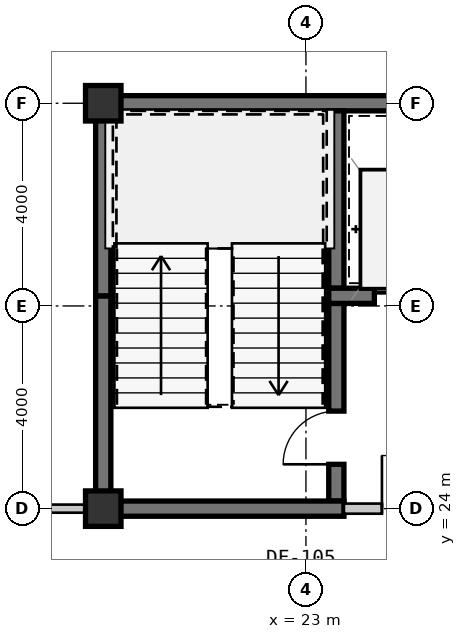
"""IFC4 building model, lengths in metres.
Left out: names, types, materials, properties, quantities, classifications, styles, units other than length and angle.
Written with IfcOpenShell. Run it as: python <this file> out.ifc"""

import sys

from ifc_helpers import new_model, si_unit, direction, frame, frame_2d, origin, origin_2d, place, context, subcontext, project, spatial, rectangle, extrude, source, transform, mapped, element, fill, save


model = new_model("IFC4")
c1 = context("Model", 3, precision=1e-05, world=origin(), true_north=direction((0.0, 1.0)))
c2 = subcontext(c1, "Body", "Model", "MODEL_VIEW")
j1 = project(units=[si_unit("LENGTHUNIT", "METRE"), si_unit("PLANEANGLEUNIT", "RADIAN")], contexts=[c1])
p1 = place(None, origin())
s1 = spatial("IfcSite", under=j1, at=p1, CompositionType="ELEMENT")
p2 = place(p1, origin())
s2 = spatial("IfcBuilding", under=s1, at=p2, CompositionType="ELEMENT")
p3 = place(p2, frame((0.0, 0.0, 87.15)))
s3 = spatial("IfcBuildingStorey", under=s2, at=p3, CompositionType="ELEMENT", Elevation=87.15)
m1 = source(origin(), c2, "Body", "SweptSolid", [
    extrude(rectangle(XDim=0.7, YDim=0.7, at=origin_2d()), origin(), (0.0, 0.0, 1.0), 3.15),
])
for number, where, z_axis, x_axis in (
    (1, (19.0, 24.0, 0.0), (0.0, 0.0, 1.0), (1.0, 0.0, 0.0)),
    (2, (19.0, 32.0, 0.0), (0.0, 0.0, 1.0), (1.0, 0.0, 0.0)),
):
    element("IfcColumn", number, at=place(p3, frame(where, z_axis=z_axis, x_axis=x_axis)), inside=s3, PredefinedType="COLUMN", context=c2, shape_type="MappedRepresentation", body=[
        mapped(m1, transform((0.0, 0.0, 0.0), scale=1.0)),
    ])
m2 = source(origin(), c2, "Body", "SweptSolid", [
    extrude(rectangle(XDim=9.15, YDim=0.3, at=frame_2d((4.575, 0.0))), origin(), (0.0, 0.0, 1.0), 2.93),
])
p4 = place(p3, frame((18.85, 32.0, 0.0), z_axis=(0.0, 0.0, 1.0), x_axis=(1.0, 0.0, 0.0)))
e3 = element("IfcWall", 3, at=p4, inside=s3, PredefinedType="SHEAR", context=c2, shape_type="MappedRepresentation", body=[
    mapped(m2, transform((0.0, 0.0, 0.0), scale=1.0)),
])
m3 = source(origin(), c2, "Body", "SweptSolid", [
    extrude(rectangle(XDim=4.05, YDim=0.3, at=frame_2d((2.025, 0.0))), origin(), (0.0, 0.0, 1.0), 2.93),
])
p5 = place(p3, frame((19.0, 24.15, 0.0), z_axis=(0.0, 0.0, 1.0), x_axis=(0.0, 1.0, 0.0)))
e4 = element("IfcWall", 4, at=p5, inside=s3, PredefinedType="SHEAR", context=c2, shape_type="MappedRepresentation", body=[
    mapped(m3, transform((0.0, 0.0, 0.0), scale=1.0)),
])
m4 = source(origin(), c2, "Body", "SweptSolid", [
    extrude(rectangle(XDim=3.65, YDim=0.3, at=frame_2d((1.825, 0.0))), origin(), (0.0, 0.0, 1.0), 2.93),
])
p6 = place(p3, frame((19.0, 28.2, 0.0), z_axis=(0.0, 0.0, 1.0), x_axis=(0.0, 1.0, 0.0)))
e5 = element("IfcWall", 5, at=p6, inside=s3, PredefinedType="SHEAR", context=c2, shape_type="MappedRepresentation", body=[
    mapped(m4, transform((0.0, 0.0, 0.0), scale=1.0)),
])
m5 = source(origin(), c2, "Body", "SweptSolid", [
    extrude(rectangle(XDim=3.5, YDim=0.3, at=frame_2d((1.75, 0.0))), origin(), (0.0, 0.0, 1.0), 2.93),
])
p7 = place(p3, frame((23.6, 28.35, 0.0), z_axis=(0.0, 0.0, 1.0), x_axis=(0.0, 1.0, 0.0)))
e6 = element("IfcWall", 6, at=p7, inside=s3, PredefinedType="SHEAR", context=c2, shape_type="MappedRepresentation", body=[
    mapped(m5, transform((0.0, 0.0, 0.0), scale=1.0)),
])
m6 = source(origin(), c2, "Body", "SweptSolid", [
    extrude(rectangle(XDim=3.9, YDim=0.3, at=frame_2d((1.95, 0.0))), origin(), (0.0, 0.0, 1.0), 2.93),
])
p8 = place(p3, frame((23.6, 24.15, 0.0), z_axis=(0.0, 0.0, 1.0), x_axis=(0.0, 1.0, 0.0)))
e7 = element("IfcWall", 7, at=p8, inside=s3, PredefinedType="SHEAR", context=c2, shape_type="MappedRepresentation", body=[
    mapped(m6, transform((0.0, 0.0, 0.0), scale=1.0)),
])
m7 = source(origin(), c2, "Body", "SweptSolid", [
    extrude(rectangle(XDim=1.05, YDim=2.1, at=frame_2d((0.525, 1.05))), frame((0.0, 0.16, 0.0), z_axis=(0.0, -1.0, 0.0), x_axis=(1.0, 0.0, 0.0)), (0.0, 0.0, 1.0), 0.32),
])
p9 = place(p8, frame((0.725, 0.0, 0.0)))
e8 = element("IfcOpeningElement", 8, at=p9, cuts=e7, PredefinedType="OPENING", context=c2, shape_type="MappedRepresentation", body=[
    mapped(m7, transform((0.0, 0.0, 0.0), scale=1.0)),
])
m8 = source(origin(), c2, "Body", "SweptSolid", [
    extrude(rectangle(XDim=4.9, YDim=0.3, at=frame_2d((2.45, 0.0))), origin(), (0.0, 0.0, 1.0), 2.93),
])
p10 = place(p3, frame((18.85, 24.0, 0.0), z_axis=(0.0, 0.0, 1.0), x_axis=(1.0, 0.0, 0.0)))
e9 = element("IfcWall", 9, at=p10, inside=s3, PredefinedType="SHEAR", context=c2, shape_type="MappedRepresentation", body=[
    mapped(m8, transform((0.0, 0.0, 0.0), scale=1.0)),
])
m9 = source(origin(), c2, "Body", "SweptSolid", [
    extrude(rectangle(XDim=2.9, YDim=0.3, at=frame_2d((1.45, 0.0))), origin(), (0.0, 0.0, 1.0), 2.93),
])
p11 = place(p3, frame((23.45, 28.2, 0.0), z_axis=(0.0, 0.0, 1.0), x_axis=(1.0, 0.0, 0.0)))
e10 = element("IfcWall", 10, at=p11, inside=s3, PredefinedType="SHEAR", context=c2, shape_type="MappedRepresentation", body=[
    mapped(m9, transform((0.0, 0.0, 0.0), scale=1.0)),
])
m10 = source(origin(), c2, "Body", "SweptSolid", [
    extrude(rectangle(XDim=1.1, YDim=2.15, at=frame_2d((0.55, 1.075))), frame((0.0, 0.16, 0.0), z_axis=(0.0, -1.0, 0.0), x_axis=(1.0, 0.0, 0.0)), (0.0, 0.0, 1.0), 0.32),
])
p12 = place(p11, frame((0.9, 0.0, 0.0)))
e11 = element("IfcOpeningElement", 11, at=p12, cuts=e10, PredefinedType="OPENING", context=c2, shape_type="MappedRepresentation", body=[
    mapped(m10, transform((0.0, 0.0, 0.0), scale=1.0)),
])
m11 = source(origin(), c2, "Body", "SweptSolid", [
    extrude(rectangle(XDim=2.7, YDim=0.2, at=frame_2d((1.35, 0.0))), origin(), (0.0, 0.0, 1.0), 2.47),
])
p13 = place(p3, frame((23.75, 24.0, 0.0), z_axis=(0.0, 0.0, 1.0), x_axis=(1.0, 0.0, 0.0)))
e12 = element("IfcWall", 12, at=p13, inside=s3, PredefinedType="SOLIDWALL", context=c2, shape_type="MappedRepresentation", body=[
    mapped(m11, transform((0.0, 0.0, 0.0), scale=1.0)),
])
m12 = source(origin(), c2, "Body", "SweptSolid", [
    extrude(rectangle(XDim=1.05, YDim=2.1, at=frame_2d((0.525, 1.05))), frame((0.0, 0.11, 0.0), z_axis=(0.0, -1.0, 0.0), x_axis=(1.0, 0.0, 0.0)), (0.0, 0.0, 1.0), 0.22),
])
p14 = place(p13, frame((0.75, 0.0, 0.0)))
e13 = element("IfcOpeningElement", 13, at=p14, cuts=e12, PredefinedType="OPENING", context=c2, shape_type="MappedRepresentation", body=[
    mapped(m12, transform((0.0, 0.0, 0.0), scale=1.0)),
])
m13 = source(origin(), c2, "Body", "SweptSolid", [
    extrude(rectangle(XDim=4.17, YDim=0.16, at=frame_2d((2.085, 0.0))), origin(), (0.0, 0.0, 1.0), 2.93),
])
p15 = place(p3, frame((14.68, 24.0, 0.0), z_axis=(0.0, 0.0, 1.0), x_axis=(1.0, 0.0, 0.0)))
e14 = element("IfcWall", 14, at=p15, inside=s3, PredefinedType="PARTITIONING", context=c2, shape_type="MappedRepresentation", body=[
    mapped(m13, transform((0.0, 0.0, 0.0), scale=1.0)),
])
m14 = source(origin(), c2, "Body", "SweptSolid", [
    extrude(rectangle(XDim=0.92, YDim=2.1, at=frame_2d((0.46, 1.05))), frame((0.0, 0.09, 0.0), z_axis=(0.0, -1.0, 0.0), x_axis=(1.0, 0.0, 0.0)), (0.0, 0.0, 1.0), 0.18),
])
p16 = place(p15, frame((1.69, 0.0, 0.0)))
e15 = element("IfcOpeningElement", 15, at=p16, cuts=e14, PredefinedType="OPENING", context=c2, shape_type="MappedRepresentation", body=[
    mapped(m14, transform((0.0, 0.0, 0.0), scale=1.0)),
])
m15 = source(origin(), c2, "Body", "SweptSolid", [
    extrude(rectangle(XDim=1.05, YDim=2.1, at=frame_2d((0.525, 1.05))), frame((0.0, 0.025, 0.0), z_axis=(0.0, -1.0, 0.0), x_axis=(1.0, 0.0, 0.0)), (0.0, 0.0, 1.0), 0.05),
])
p17 = place(p9, origin())
e16 = element("IfcDoor", 16, at=p17, inside=s3, OperationType="SINGLE_SWING_LEFT", PredefinedType="DOOR", context=c2, shape_type="MappedRepresentation", body=[
    mapped(m15, transform((0.0, 0.0, 0.0), scale=1.0)),
])
fill(e8, e16)
m16 = source(origin(), c2, "Body", "SweptSolid", [
    extrude(rectangle(XDim=1.1, YDim=2.15, at=frame_2d((0.55, 1.075))), frame((0.0, 0.025, 0.0), z_axis=(0.0, -1.0, 0.0), x_axis=(1.0, 0.0, 0.0)), (0.0, 0.0, 1.0), 0.05),
])
p18 = place(p12, origin())
e17 = element("IfcDoor", 17, at=p18, inside=s3, OperationType="SLIDING_TO_LEFT", PredefinedType="DOOR", context=c2, shape_type="MappedRepresentation", body=[
    mapped(m16, transform((0.0, 0.0, 0.0), scale=1.0)),
])
fill(e11, e17)
p19 = place(p14, origin())
e18 = element("IfcDoor", 18, at=p19, inside=s3, OperationType="SINGLE_SWING_LEFT", PredefinedType="DOOR", context=c2, shape_type="MappedRepresentation", body=[
    mapped(m15, transform((0.0, 0.0, 0.0), scale=1.0)),
])
fill(e13, e18)
save(model, sys.argv[1])
